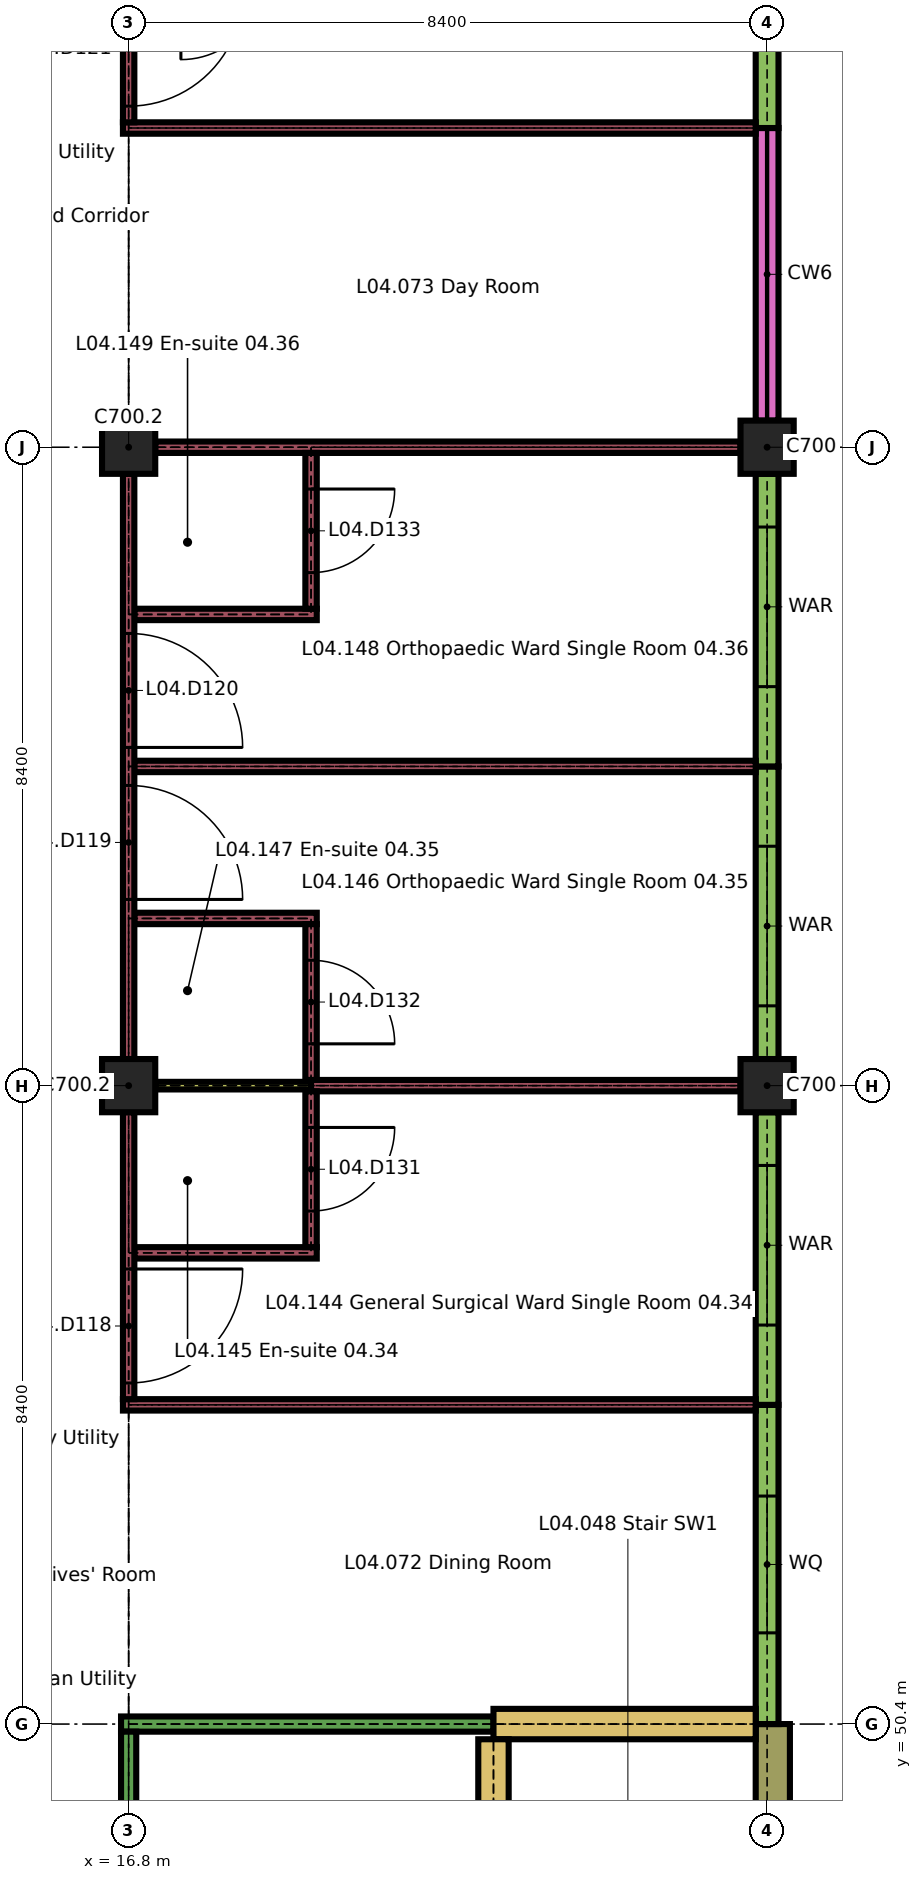
"""IFC4 building model, lengths in metres.
Left out: names, types, materials, properties, quantities, classifications, styles, units other than length and angle.
Written with IfcOpenShell. Run it as: python <this file> out.ifc"""

import sys

from ifc_helpers import new_model, si_unit, direction, frame, frame_2d, origin, origin_2d, place, context, subcontext, project, spatial, rectangle, extrude, element, fill, save


model = new_model("IFC4")
c1 = context("Model", 3, precision=1e-05, world=origin(), true_north=direction((0.0, 1.0)))
c2 = subcontext(c1, "Body", "Model", "MODEL_VIEW")
j1 = project(units=[si_unit("LENGTHUNIT", "METRE"), si_unit("PLANEANGLEUNIT", "RADIAN")], contexts=[c1])
p1 = place(None, origin())
s1 = spatial("IfcSite", under=j1, at=p1, CompositionType="ELEMENT")
p2 = place(p1, origin())
s2 = spatial("IfcBuilding", under=s1, at=p2, CompositionType="ELEMENT")
p3 = place(p2, frame((0.0, 0.0, 18.9)))
s3 = spatial("IfcBuildingStorey", under=s2, at=p3, CompositionType="ELEMENT", Elevation=18.9)
for number, where, z_axis, x_axis in (
    (1, (16.8, 58.8, 0.0), (0.0, 0.0, 1.0), (1.0, 0.0, 0.0)),
    (2, (25.2, 58.8, 0.0), (0.0, 0.0, 1.0), (1.0, 0.0, 0.0)),
    (3, (16.8, 67.2, 0.0), (0.0, 0.0, 1.0), (1.0, 0.0, 0.0)),
    (4, (25.2, 67.2, 0.0), (0.0, 0.0, 1.0), (1.0, 0.0, 0.0)),
):
    element("IfcColumn", number, at=place(p3, frame(where, z_axis=z_axis, x_axis=x_axis)), inside=s3, PredefinedType="COLUMN", context=c2, shape_type="SweptSolid", body=[
        extrude(rectangle(XDim=0.7, YDim=0.7, at=origin_2d()), origin(), (0.0, 0.0, 1.0), 3.26),
    ])
p4 = place(p3, frame((25.275, 46.55, 0.0), z_axis=(0.0, 0.0, 1.0), x_axis=(0.0, 1.0, 0.0)))
e5 = element("IfcWall", 5, at=p4, inside=s3, PredefinedType="SOLIDWALL", context=c2, shape_type="SweptSolid", body=[
    extrude(rectangle(XDim=3.85, YDim=0.45, at=frame_2d((1.925, 0.0))), origin(), (0.0, 0.0, 1.0), 3.26),
])
p5 = place(p3, frame((25.2, 50.4, 0.0), z_axis=(0.0, 0.0, 1.0), x_axis=(0.0, 1.0, 0.0)))
e6 = element("IfcWall", 6, at=p5, inside=s3, PredefinedType="SOLIDWALL", context=c2, shape_type="SweptSolid", body=[
    extrude(rectangle(XDim=4.2, YDim=0.3, at=frame_2d((2.1, 0.0))), origin(), (0.0, 0.0, 1.0), 2.96),
])
p6 = place(p5, frame((1.2, 0.0, 1.05)))
e7 = element("IfcOpeningElement", 7, at=p6, cuts=e6, PredefinedType="OPENING", context=c2, shape_type="SweptSolid", body=[
    extrude(rectangle(XDim=1.8, YDim=1.2, at=frame_2d((0.9, 0.6))), frame((0.0, 0.16, 0.0), z_axis=(0.0, -1.0, 0.0), x_axis=(1.0, 0.0, 0.0)), (0.0, 0.0, 1.0), 0.32),
])
p7 = place(p3, frame((25.2, 54.6, 0.0), z_axis=(0.0, 0.0, 1.0), x_axis=(0.0, 1.0, 0.0)))
e8 = element("IfcWall", 8, at=p7, inside=s3, PredefinedType="SOLIDWALL", context=c2, shape_type="SweptSolid", body=[
    extrude(rectangle(XDim=3.85, YDim=0.3, at=frame_2d((1.925, 0.0))), origin(), (0.0, 0.0, 1.0), 2.96),
])
p8 = place(p7, frame((1.05, 0.0, 0.9)))
e9 = element("IfcOpeningElement", 9, at=p8, cuts=e8, PredefinedType="OPENING", context=c2, shape_type="SweptSolid", body=[
    extrude(rectangle(XDim=2.1, YDim=1.5, at=frame_2d((1.05, 0.75))), frame((0.0, 0.16, 0.0), z_axis=(0.0, -1.0, 0.0), x_axis=(1.0, 0.0, 0.0)), (0.0, 0.0, 1.0), 0.32),
])
p9 = place(p3, frame((25.2, 59.15, 0.0), z_axis=(0.0, 0.0, 1.0), x_axis=(0.0, 1.0, 0.0)))
e10 = element("IfcWall", 10, at=p9, inside=s3, PredefinedType="SOLIDWALL", context=c2, shape_type="SweptSolid", body=[
    extrude(rectangle(XDim=3.85, YDim=0.3, at=frame_2d((1.925, 0.0))), origin(), (0.0, 0.0, 1.0), 2.96),
])
p10 = place(p9, frame((0.7, 0.0, 0.9)))
e11 = element("IfcOpeningElement", 11, at=p10, cuts=e10, PredefinedType="OPENING", context=c2, shape_type="SweptSolid", body=[
    extrude(rectangle(XDim=2.1, YDim=1.5, at=frame_2d((1.05, 0.75))), frame((0.0, 0.16, 0.0), z_axis=(0.0, -1.0, 0.0), x_axis=(1.0, 0.0, 0.0)), (0.0, 0.0, 1.0), 0.32),
])
p11 = place(p3, frame((25.2, 63.0, 0.0), z_axis=(0.0, 0.0, 1.0), x_axis=(0.0, 1.0, 0.0)))
e12 = element("IfcWall", 12, at=p11, inside=s3, PredefinedType="SOLIDWALL", context=c2, shape_type="SweptSolid", body=[
    extrude(rectangle(XDim=3.85, YDim=0.3, at=frame_2d((1.925, 0.0))), origin(), (0.0, 0.0, 1.0), 2.96),
])
p12 = place(p11, frame((1.05, 0.0, 0.9)))
e13 = element("IfcOpeningElement", 13, at=p12, cuts=e12, PredefinedType="OPENING", context=c2, shape_type="SweptSolid", body=[
    extrude(rectangle(XDim=2.1, YDim=1.5, at=frame_2d((1.05, 0.75))), frame((0.0, 0.16, 0.0), z_axis=(0.0, -1.0, 0.0), x_axis=(1.0, 0.0, 0.0)), (0.0, 0.0, 1.0), 0.32),
])
p13 = place(p3, frame((25.2, 67.55, 0.0), z_axis=(0.0, 0.0, 1.0), x_axis=(0.0, 1.0, 0.0)))
e14 = element("IfcWall", 14, at=p13, inside=s3, PredefinedType="SOLIDWALL", context=c2, shape_type="SweptSolid", body=[
    extrude(rectangle(XDim=3.85, YDim=0.3, at=frame_2d((1.925, 0.0))), origin(), (0.0, 0.0, 1.0), 0.6),
])
p14 = place(p3, frame((25.2, 71.4, 0.0), z_axis=(0.0, 0.0, 1.0), x_axis=(0.0, 1.0, 0.0)))
e15 = element("IfcWall", 15, at=p14, inside=s3, PredefinedType="SOLIDWALL", context=c2, shape_type="SweptSolid", body=[
    extrude(rectangle(XDim=4.2, YDim=0.3, at=frame_2d((2.1, 0.0))), origin(), (0.0, 0.0, 1.0), 2.96),
])
p15 = place(p14, frame((1.05, 0.0, 0.9)))
e16 = element("IfcOpeningElement", 16, at=p15, cuts=e15, PredefinedType="OPENING", context=c2, shape_type="SweptSolid", body=[
    extrude(rectangle(XDim=2.1, YDim=1.5, at=frame_2d((1.05, 0.75))), frame((0.0, 0.16, 0.0), z_axis=(0.0, -1.0, 0.0), x_axis=(1.0, 0.0, 0.0)), (0.0, 0.0, 1.0), 0.32),
])
p16 = place(p3, frame((16.7, 50.4, 0.0), z_axis=(0.0, 0.0, 1.0), x_axis=(1.0, 0.0, 0.0)))
e17 = element("IfcWall", 17, at=p16, inside=s3, PredefinedType="PARTITIONING", context=c2, shape_type="SweptSolid", body=[
    extrude(rectangle(XDim=4.9, YDim=0.2, at=frame_2d((2.45, 0.0))), origin(), (0.0, 0.0, 1.0), 3.26),
])
p17 = place(p3, frame((21.6, 50.4, 0.0), z_axis=(0.0, 0.0, 1.0), x_axis=(1.0, 0.0, 0.0)))
e18 = element("IfcWall", 18, at=p17, inside=s3, PredefinedType="SHEAR", context=c2, shape_type="SweptSolid", body=[
    extrude(rectangle(XDim=3.45, YDim=0.4, at=frame_2d((1.725, 0.0))), origin(), (0.0, 0.0, 1.0), 3.26),
])
p18 = place(p3, frame((16.725, 54.6, 0.0), z_axis=(0.0, 0.0, 1.0), x_axis=(1.0, 0.0, 0.0)))
e19 = element("IfcWall", 19, at=p18, inside=s3, PredefinedType="PARTITIONING", context=c2, shape_type="SweptSolid", body=[
    extrude(rectangle(XDim=8.325, YDim=0.15, at=frame_2d((4.163, 0.0))), origin(), (0.0, 0.0, 1.0), 3.26),
])
p19 = place(p3, frame((16.875, 56.6, 0.0), z_axis=(0.0, 0.0, 1.0), x_axis=(1.0, 0.0, 0.0)))
e20 = element("IfcWall", 20, at=p19, inside=s3, PredefinedType="PARTITIONING", context=c2, shape_type="SweptSolid", body=[
    extrude(rectangle(XDim=2.4, YDim=0.15, at=frame_2d((1.2, 0.0))), origin(), (0.0, 0.0, 1.0), 3.26),
])
p20 = place(p3, frame((17.15, 58.8, 0.0), z_axis=(0.0, 0.0, 1.0), x_axis=(1.0, 0.0, 0.0)))
e21 = element("IfcWall", 21, at=p20, inside=s3, PredefinedType="PARTITIONING", context=c2, shape_type="SweptSolid", body=[
    extrude(rectangle(XDim=2.05, YDim=0.1, at=frame_2d((1.025, 0.0))), origin(), (0.0, 0.0, 1.0), 3.26),
])
p21 = place(p3, frame((19.2, 58.8, 0.0), z_axis=(0.0, 0.0, 1.0), x_axis=(1.0, 0.0, 0.0)))
e22 = element("IfcWall", 22, at=p21, inside=s3, PredefinedType="PARTITIONING", context=c2, shape_type="SweptSolid", body=[
    extrude(rectangle(XDim=5.65, YDim=0.15, at=frame_2d((2.825, 0.0))), origin(), (0.0, 0.0, 1.0), 3.26),
])
p22 = place(p3, frame((16.875, 61.0, 0.0), z_axis=(0.0, 0.0, 1.0), x_axis=(1.0, 0.0, 0.0)))
e23 = element("IfcWall", 23, at=p22, inside=s3, PredefinedType="PARTITIONING", context=c2, shape_type="SweptSolid", body=[
    extrude(rectangle(XDim=2.4, YDim=0.15, at=frame_2d((1.2, 0.0))), origin(), (0.0, 0.0, 1.0), 3.26),
])
p23 = place(p3, frame((16.875, 63.0, 0.0), z_axis=(0.0, 0.0, 1.0), x_axis=(1.0, 0.0, 0.0)))
e24 = element("IfcWall", 24, at=p23, inside=s3, PredefinedType="PARTITIONING", context=c2, shape_type="SweptSolid", body=[
    extrude(rectangle(XDim=8.175, YDim=0.15, at=frame_2d((4.087, 0.0))), origin(), (0.0, 0.0, 1.0), 3.26),
])
p24 = place(p3, frame((16.875, 65.0, 0.0), z_axis=(0.0, 0.0, 1.0), x_axis=(1.0, 0.0, 0.0)))
e25 = element("IfcWall", 25, at=p24, inside=s3, PredefinedType="PARTITIONING", context=c2, shape_type="SweptSolid", body=[
    extrude(rectangle(XDim=2.4, YDim=0.15, at=frame_2d((1.2, 0.0))), origin(), (0.0, 0.0, 1.0), 3.26),
])
p25 = place(p3, frame((17.15, 67.2, 0.0), z_axis=(0.0, 0.0, 1.0), x_axis=(1.0, 0.0, 0.0)))
e26 = element("IfcWall", 26, at=p25, inside=s3, PredefinedType="PARTITIONING", context=c2, shape_type="SweptSolid", body=[
    extrude(rectangle(XDim=7.7, YDim=0.15, at=frame_2d((3.85, 0.0))), origin(), (0.0, 0.0, 1.0), 3.26),
])
p26 = place(p3, frame((16.725, 71.4, 0.0), z_axis=(0.0, 0.0, 1.0), x_axis=(1.0, 0.0, 0.0)))
e27 = element("IfcWall", 27, at=p26, inside=s3, PredefinedType="PARTITIONING", context=c2, shape_type="SweptSolid", body=[
    extrude(rectangle(XDim=8.325, YDim=0.15, at=frame_2d((4.163, 0.0))), origin(), (0.0, 0.0, 1.0), 3.26),
])
p27 = place(p3, frame((16.8, 42.0, 0.0), z_axis=(0.0, 0.0, 1.0), x_axis=(0.0, 1.0, 0.0)))
e28 = element("IfcWall", 28, at=p27, inside=s3, PredefinedType="PARTITIONING", context=c2, shape_type="SweptSolid", body=[
    extrude(rectangle(XDim=8.3, YDim=0.2, at=frame_2d((4.15, 0.0))), origin(), (0.0, 0.0, 1.0), 3.26),
])
p28 = place(p27, frame((3.15, 0.0, 0.0)))
e29 = element("IfcOpeningElement", 29, at=p28, cuts=e28, PredefinedType="OPENING", context=c2, shape_type="SweptSolid", body=[
    extrude(rectangle(XDim=2.0, YDim=2.4, at=frame_2d((1.0, 1.2))), frame((0.0, 0.11, 0.0), z_axis=(0.0, -1.0, 0.0), x_axis=(1.0, 0.0, 0.0)), (0.0, 0.0, 1.0), 0.22),
])
p29 = place(p3, frame((16.8, 54.675, 0.0), z_axis=(0.0, 0.0, 1.0), x_axis=(0.0, 1.0, 0.0)))
e30 = element("IfcWall", 30, at=p29, inside=s3, PredefinedType="PARTITIONING", context=c2, shape_type="SweptSolid", body=[
    extrude(rectangle(XDim=3.775, YDim=0.15, at=frame_2d((1.887, 0.0))), origin(), (0.0, 0.0, 1.0), 3.26),
])
p30 = place(p29, frame((0.212, 0.0, 0.0)))
e31 = element("IfcOpeningElement", 31, at=p30, cuts=e30, PredefinedType="OPENING", context=c2, shape_type="SweptSolid", body=[
    extrude(rectangle(XDim=1.5, YDim=2.4, at=frame_2d((0.75, 1.2))), frame((0.0, 0.085, 0.0), z_axis=(0.0, -1.0, 0.0), x_axis=(1.0, 0.0, 0.0)), (0.0, 0.0, 1.0), 0.17),
])
p31 = place(p3, frame((16.8, 59.15, 0.0), z_axis=(0.0, 0.0, 1.0), x_axis=(0.0, 1.0, 0.0)))
e32 = element("IfcWall", 32, at=p31, inside=s3, PredefinedType="PARTITIONING", context=c2, shape_type="SweptSolid", body=[
    extrude(rectangle(XDim=7.7, YDim=0.15, at=frame_2d((3.85, 0.0))), origin(), (0.0, 0.0, 1.0), 3.26),
])
p32 = place(p31, frame((2.1, 0.0, 0.0)))
e33 = element("IfcOpeningElement", 33, at=p32, cuts=e32, PredefinedType="OPENING", context=c2, shape_type="SweptSolid", body=[
    extrude(rectangle(XDim=1.5, YDim=2.4, at=frame_2d((0.75, 1.2))), frame((0.0, 0.085, 0.0), z_axis=(0.0, -1.0, 0.0), x_axis=(1.0, 0.0, 0.0)), (0.0, 0.0, 1.0), 0.17),
])
p33 = place(p31, frame((4.1, 0.0, 0.0)))
e34 = element("IfcOpeningElement", 34, at=p33, cuts=e32, PredefinedType="OPENING", context=c2, shape_type="SweptSolid", body=[
    extrude(rectangle(XDim=1.5, YDim=2.4, at=frame_2d((0.75, 1.2))), frame((0.0, 0.085, 0.0), z_axis=(0.0, -1.0, 0.0), x_axis=(1.0, 0.0, 0.0)), (0.0, 0.0, 1.0), 0.17),
])
p34 = place(p3, frame((16.8, 71.475, 0.0), z_axis=(0.0, 0.0, 1.0), x_axis=(0.0, 1.0, 0.0)))
e35 = element("IfcWall", 35, at=p34, inside=s3, PredefinedType="PARTITIONING", context=c2, shape_type="SweptSolid", body=[
    extrude(rectangle(XDim=4.125, YDim=0.15, at=frame_2d((2.062, 0.0))), origin(), (0.0, 0.0, 1.0), 3.26),
])
p35 = place(p34, frame((0.212, 0.0, 0.0)))
e36 = element("IfcOpeningElement", 36, at=p35, cuts=e35, PredefinedType="OPENING", context=c2, shape_type="SweptSolid", body=[
    extrude(rectangle(XDim=1.5, YDim=2.4, at=frame_2d((0.75, 1.2))), frame((0.0, 0.085, 0.0), z_axis=(0.0, -1.0, 0.0), x_axis=(1.0, 0.0, 0.0)), (0.0, 0.0, 1.0), 0.17),
])
p36 = place(p3, frame((19.2, 56.675, 0.0), z_axis=(0.0, 0.0, 1.0), x_axis=(0.0, 1.0, 0.0)))
e37 = element("IfcWall", 37, at=p36, inside=s3, PredefinedType="PARTITIONING", context=c2, shape_type="SweptSolid", body=[
    extrude(rectangle(XDim=2.05, YDim=0.15, at=frame_2d((1.025, 0.0))), origin(), (0.0, 0.0, 1.0), 3.26),
])
p37 = place(p36, frame((0.475, 0.0, 0.0)))
e38 = element("IfcOpeningElement", 38, at=p37, cuts=e37, PredefinedType="OPENING", context=c2, shape_type="SweptSolid", body=[
    extrude(rectangle(XDim=1.1, YDim=2.1, at=frame_2d((0.55, 1.05))), frame((0.0, 0.085, 0.0), z_axis=(0.0, -1.0, 0.0), x_axis=(1.0, 0.0, 0.0)), (0.0, 0.0, 1.0), 0.17),
])
p38 = place(p3, frame((19.2, 58.875, 0.0), z_axis=(0.0, 0.0, 1.0), x_axis=(0.0, 1.0, 0.0)))
e39 = element("IfcWall", 39, at=p38, inside=s3, PredefinedType="PARTITIONING", context=c2, shape_type="SweptSolid", body=[
    extrude(rectangle(XDim=2.05, YDim=0.15, at=frame_2d((1.025, 0.0))), origin(), (0.0, 0.0, 1.0), 3.26),
])
p39 = place(p38, frame((0.475, 0.0, 0.0)))
e40 = element("IfcOpeningElement", 40, at=p39, cuts=e39, PredefinedType="OPENING", context=c2, shape_type="SweptSolid", body=[
    extrude(rectangle(XDim=1.1, YDim=2.1, at=frame_2d((0.55, 1.05))), frame((0.0, 0.085, 0.0), z_axis=(0.0, -1.0, 0.0), x_axis=(1.0, 0.0, 0.0)), (0.0, 0.0, 1.0), 0.17),
])
p40 = place(p3, frame((19.2, 65.075, 0.0), z_axis=(0.0, 0.0, 1.0), x_axis=(0.0, 1.0, 0.0)))
e41 = element("IfcWall", 41, at=p40, inside=s3, PredefinedType="PARTITIONING", context=c2, shape_type="SweptSolid", body=[
    extrude(rectangle(XDim=2.05, YDim=0.15, at=frame_2d((1.025, 0.0))), origin(), (0.0, 0.0, 1.0), 3.26),
])
p41 = place(p40, frame((0.475, 0.0, 0.0)))
e42 = element("IfcOpeningElement", 42, at=p41, cuts=e41, PredefinedType="OPENING", context=c2, shape_type="SweptSolid", body=[
    extrude(rectangle(XDim=1.1, YDim=2.1, at=frame_2d((0.55, 1.05))), frame((0.0, 0.085, 0.0), z_axis=(0.0, -1.0, 0.0), x_axis=(1.0, 0.0, 0.0)), (0.0, 0.0, 1.0), 0.17),
])
p42 = place(p3, frame((21.6, 42.2, 0.0), z_axis=(0.0, 0.0, 1.0), x_axis=(0.0, 1.0, 0.0)))
e43 = element("IfcWall", 43, at=p42, inside=s3, PredefinedType="SHEAR", context=c2, shape_type="SweptSolid", body=[
    extrude(rectangle(XDim=8.0, YDim=0.4, at=frame_2d((4.0, 0.0))), origin(), (0.0, 0.0, 1.0), 3.26),
])
p43 = place(p42, frame((0.4, 0.0, 0.0)))
e44 = element("IfcOpeningElement", 44, at=p43, cuts=e43, PredefinedType="OPENING", context=c2, shape_type="SweptSolid", body=[
    extrude(rectangle(XDim=1.2, YDim=2.1, at=frame_2d((0.6, 1.05))), frame((0.0, 0.21, 0.0), z_axis=(0.0, -1.0, 0.0), x_axis=(1.0, 0.0, 0.0)), (0.0, 0.0, 1.0), 0.42),
])
p44 = place(p6, origin())
e45 = element("IfcWindow", 45, at=p44, inside=s3, PartitioningType="DOUBLE_PANEL_VERTICAL", PredefinedType="WINDOW", context=c2, shape_type="SweptSolid", body=[
    extrude(rectangle(XDim=1.8, YDim=1.2, at=frame_2d((0.9, 0.6))), frame((0.0, 0.03, 0.0), z_axis=(0.0, -1.0, 0.0), x_axis=(1.0, 0.0, 0.0)), (0.0, 0.0, 1.0), 0.06),
])
fill(e7, e45)
p45 = place(p8, origin())
e46 = element("IfcWindow", 46, at=p45, inside=s3, PartitioningType="DOUBLE_PANEL_VERTICAL", PredefinedType="WINDOW", context=c2, shape_type="SweptSolid", body=[
    extrude(rectangle(XDim=2.1, YDim=1.5, at=frame_2d((1.05, 0.75))), frame((0.0, 0.05, 0.0), z_axis=(0.0, -1.0, 0.0), x_axis=(1.0, 0.0, 0.0)), (0.0, 0.0, 1.0), 0.1),
])
fill(e9, e46)
p46 = place(p10, origin())
e47 = element("IfcWindow", 47, at=p46, inside=s3, PartitioningType="DOUBLE_PANEL_VERTICAL", PredefinedType="WINDOW", context=c2, shape_type="SweptSolid", body=[
    extrude(rectangle(XDim=2.1, YDim=1.5, at=frame_2d((1.05, 0.75))), frame((0.0, 0.05, 0.0), z_axis=(0.0, -1.0, 0.0), x_axis=(1.0, 0.0, 0.0)), (0.0, 0.0, 1.0), 0.1),
])
fill(e11, e47)
p47 = place(p12, origin())
e48 = element("IfcWindow", 48, at=p47, inside=s3, PartitioningType="DOUBLE_PANEL_VERTICAL", PredefinedType="WINDOW", context=c2, shape_type="SweptSolid", body=[
    extrude(rectangle(XDim=2.1, YDim=1.5, at=frame_2d((1.05, 0.75))), frame((0.0, 0.05, 0.0), z_axis=(0.0, -1.0, 0.0), x_axis=(1.0, 0.0, 0.0)), (0.0, 0.0, 1.0), 0.1),
])
fill(e13, e48)
p48 = place(p30, origin())
e49 = element("IfcDoor", 49, at=p48, inside=s3, OperationType="SINGLE_SWING_RIGHT", PredefinedType="DOOR", context=c2, shape_type="SweptSolid", body=[
    extrude(rectangle(XDim=1.5, YDim=2.4, at=frame_2d((0.75, 1.2))), frame((0.0, 0.03, 0.0), z_axis=(0.0, -1.0, 0.0), x_axis=(1.0, 0.0, 0.0)), (0.0, 0.0, 1.0), 0.06),
])
fill(e31, e49)
p49 = place(p32, origin())
e50 = element("IfcDoor", 50, at=p49, inside=s3, OperationType="SINGLE_SWING_LEFT", PredefinedType="DOOR", context=c2, shape_type="SweptSolid", body=[
    extrude(rectangle(XDim=1.5, YDim=2.4, at=frame_2d((0.75, 1.2))), frame((0.0, 0.03, 0.0), z_axis=(0.0, -1.0, 0.0), x_axis=(1.0, 0.0, 0.0)), (0.0, 0.0, 1.0), 0.06),
])
fill(e33, e50)
p50 = place(p33, origin())
e51 = element("IfcDoor", 51, at=p50, inside=s3, OperationType="SINGLE_SWING_LEFT", PredefinedType="DOOR", context=c2, shape_type="SweptSolid", body=[
    extrude(rectangle(XDim=1.5, YDim=2.4, at=frame_2d((0.75, 1.2))), frame((0.0, 0.03, 0.0), z_axis=(0.0, -1.0, 0.0), x_axis=(1.0, 0.0, 0.0)), (0.0, 0.0, 1.0), 0.06),
])
fill(e34, e51)
p51 = place(p35, origin())
e52 = element("IfcDoor", 52, at=p51, inside=s3, OperationType="SINGLE_SWING_RIGHT", PredefinedType="DOOR", context=c2, shape_type="SweptSolid", body=[
    extrude(rectangle(XDim=1.5, YDim=2.4, at=frame_2d((0.75, 1.2))), frame((0.0, 0.03, 0.0), z_axis=(0.0, -1.0, 0.0), x_axis=(1.0, 0.0, 0.0)), (0.0, 0.0, 1.0), 0.06),
])
fill(e36, e52)
p52 = place(p37, origin())
e53 = element("IfcDoor", 53, at=p52, inside=s3, OperationType="SINGLE_SWING_RIGHT", PredefinedType="DOOR", context=c2, shape_type="SweptSolid", body=[
    extrude(rectangle(XDim=1.1, YDim=2.1, at=frame_2d((0.55, 1.05))), frame((0.0, 0.025, 0.0), z_axis=(0.0, -1.0, 0.0), x_axis=(1.0, 0.0, 0.0)), (0.0, 0.0, 1.0), 0.05),
])
fill(e38, e53)
p53 = place(p39, origin())
e54 = element("IfcDoor", 54, at=p53, inside=s3, OperationType="SINGLE_SWING_LEFT", PredefinedType="DOOR", context=c2, shape_type="SweptSolid", body=[
    extrude(rectangle(XDim=1.1, YDim=2.1, at=frame_2d((0.55, 1.05))), frame((0.0, 0.025, 0.0), z_axis=(0.0, -1.0, 0.0), x_axis=(1.0, 0.0, 0.0)), (0.0, 0.0, 1.0), 0.05),
])
fill(e40, e54)
p54 = place(p41, origin())
e55 = element("IfcDoor", 55, at=p54, inside=s3, OperationType="SINGLE_SWING_RIGHT", PredefinedType="DOOR", context=c2, shape_type="SweptSolid", body=[
    extrude(rectangle(XDim=1.1, YDim=2.1, at=frame_2d((0.55, 1.05))), frame((0.0, 0.025, 0.0), z_axis=(0.0, -1.0, 0.0), x_axis=(1.0, 0.0, 0.0)), (0.0, 0.0, 1.0), 0.05),
])
fill(e42, e55)
save(model, sys.argv[1])
